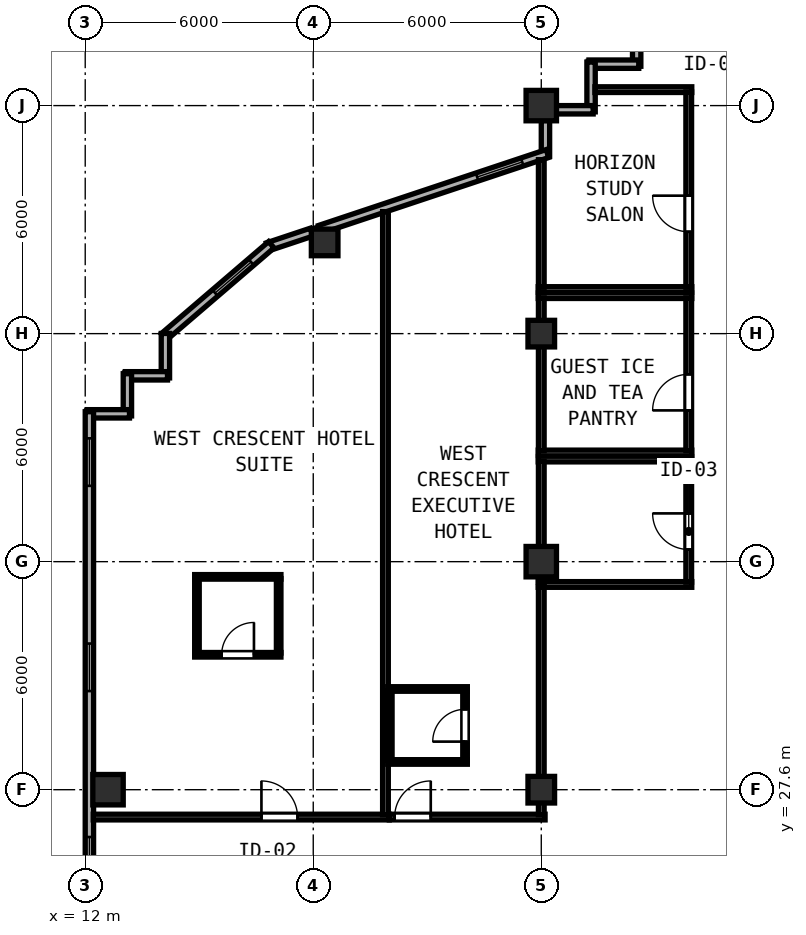
"""IFC4 building model, lengths in metres.
Left out: names, types, materials, properties, quantities, classifications, styles, units other than length and angle.
Written with IfcOpenShell. Run it as: python <this file> out.ifc"""

import sys

from ifc_helpers import new_model, si_unit, direction, frame, frame_2d, origin, origin_2d, place, context, subcontext, project, spatial, rectangle, hollow_rectangle, extrude, element, fill, save


model = new_model("IFC4")
c1 = context("Model", 3, precision=1e-05, world=origin(), true_north=direction((0.0, 1.0)))
c2 = subcontext(c1, "Body", "Model", "MODEL_VIEW")
j1 = project(units=[si_unit("LENGTHUNIT", "METRE"), si_unit("PLANEANGLEUNIT", "RADIAN")], contexts=[c1])
p1 = place(None, origin())
s1 = spatial("IfcSite", under=j1, at=p1, CompositionType="ELEMENT")
p2 = place(p1, origin())
s2 = spatial("IfcBuilding", under=s1, at=p2, CompositionType="ELEMENT")
p3 = place(p2, frame((0.0, 0.0, 246.75)))
s3 = spatial("IfcBuildingStorey", under=s2, at=p3, CompositionType="ELEMENT", Elevation=246.75)
for number, where, z_axis, x_axis in (
    (1, (24.0, 33.6, 0.0), (0.0, 0.0, 1.0), (1.0, 0.0, 0.0)),
    (2, (24.0, 45.6, 0.0), (0.0, 0.0, 1.0), (1.0, 0.0, 0.0)),
    (3, (12.6, 27.6, 0.0), (0.0, 0.0, 1.0), (1.0, 0.0, 0.0)),
):
    element("IfcColumn", number, at=place(p3, frame(where, z_axis=z_axis, x_axis=x_axis)), inside=s3, PredefinedType="COLUMN", context=c2, shape_type="SweptSolid", body=[
        extrude(hollow_rectangle(XDim=0.8, YDim=0.8, WallThickness=0.03, at=origin_2d()), origin(), (0.0, 0.0, 1.0), 3.85),
    ])
for number, where, z_axis, x_axis in (
    (4, (24.0, 27.6, 0.0), (0.0, 0.0, 1.0), (1.0, 0.0, 0.0)),
    (5, (24.0, 39.6, 0.0), (0.0, 0.0, 1.0), (1.0, 0.0, 0.0)),
    (6, (18.3, 42.0, 0.0), (0.0, 0.0, 1.0), (1.0, 0.0, 0.0)),
):
    element("IfcColumn", number, at=place(p3, frame(where, z_axis=z_axis, x_axis=x_axis)), inside=s3, PredefinedType="COLUMN", context=c2, shape_type="SweptSolid", body=[
        extrude(hollow_rectangle(XDim=0.7, YDim=0.7, WallThickness=0.026, at=origin_2d()), origin(), (0.0, 0.0, 1.0), 3.85),
    ])
p4 = place(p3, frame((26.51, 48.0, 0.0), z_axis=(0.0, 0.0, 1.0), x_axis=(0.0, -1.0, 0.0)))
e7 = element("IfcWall", 7, at=p4, inside=s3, PredefinedType="SOLIDWALL", context=c2, shape_type="SweptSolid", body=[
    extrude(rectangle(XDim=1.365, YDim=0.22, at=frame_2d((0.683, 0.0))), origin(), (0.0, 0.0, 1.0), 3.67),
])
for number, where, z_axis, x_axis in (
    (8, (26.565, 46.69, 0.0), (0.0, 0.0, 1.0), (-1.0, 0.0, 0.0)),
    (9, (25.31, 46.745, 0.0), (0.0, 0.0, 1.0), (0.0, -1.0, 0.0)),
):
    element("IfcWall", number, at=place(p3, frame(where, z_axis=z_axis, x_axis=x_axis)), inside=s3, PredefinedType="SOLIDWALL", context=c2, shape_type="SweptSolid", body=[
        extrude(rectangle(XDim=1.31, YDim=0.22, at=frame_2d((0.655, 0.0))), origin(), (0.0, 0.0, 1.0), 3.67),
    ])
p5 = place(p3, frame((25.365, 45.49, 0.0), z_axis=(0.0, 0.0, 1.0), x_axis=(-1.0, 0.0, 0.0)))
e10 = element("IfcWall", 10, at=p5, inside=s3, PredefinedType="SOLIDWALL", context=c2, shape_type="SweptSolid", body=[
    extrude(rectangle(XDim=0.973, YDim=0.22, at=frame_2d((0.486, 0.0))), origin(), (0.0, 0.0, 1.0), 3.67),
])
p6 = place(p3, frame((24.11, 45.208, 0.0), z_axis=(0.0, 0.0, 1.0), x_axis=(0.0, -1.0, 0.0)))
e11 = element("IfcWall", 11, at=p6, inside=s3, PredefinedType="SOLIDWALL", context=c2, shape_type="SweptSolid", body=[
    extrude(rectangle(XDim=0.942, YDim=0.22, at=frame_2d((0.471, 0.0))), origin(), (0.0, 0.0, 1.0), 3.315),
])
p7 = place(p3, frame((24.162, 44.338, 0.0), z_axis=(0.0, 0.0, 1.0), x_axis=(-0.948687165594, -0.31621616315, 0.0)))
e12 = element("IfcWall", 12, at=p7, inside=s3, PredefinedType="SOLIDWALL", context=c2, shape_type="SweptSolid", body=[
    extrude(rectangle(XDim=6.312, YDim=0.22, at=frame_2d((3.156, 0.0))), origin(), (0.0, 0.0, 1.0), 3.315),
])
p8 = place(p7, frame((0.7, 0.0, 0.85)))
e13 = element("IfcOpeningElement", 13, at=p8, cuts=e12, PredefinedType="OPENING", context=c2, shape_type="SweptSolid", body=[
    extrude(rectangle(XDim=1.25, YDim=1.95, at=frame_2d((0.625, 0.975))), frame((0.0, 0.12, 0.0), z_axis=(0.0, -1.0, 0.0), x_axis=(1.0, 0.0, 0.0)), (0.0, 0.0, 1.0), 0.24),
])
p9 = place(p3, frame((17.958, 42.27, 0.0), z_axis=(0.0, 0.0, 1.0), x_axis=(-0.948683298051, -0.316227766017, 0.0)))
e14 = element("IfcWall", 14, at=p9, inside=s3, PredefinedType="SOLIDWALL", context=c2, shape_type="SweptSolid", body=[
    extrude(rectangle(XDim=1.218, YDim=0.22, at=frame_2d((0.609, 0.0))), origin(), (0.0, 0.0, 1.0), 3.67),
])
p10 = place(p3, frame((16.897, 41.938, 0.0), z_axis=(0.0, 0.0, 1.0), x_axis=(-0.759279729622, -0.650764390686, 0.0)))
e15 = element("IfcWall", 15, at=p10, inside=s3, PredefinedType="SOLIDWALL", context=c2, shape_type="SweptSolid", body=[
    extrude(rectangle(XDim=3.726, YDim=0.22, at=frame_2d((1.863, 0.0))), origin(), (0.0, 0.0, 1.0), 3.67),
])
p11 = place(p10, frame((0.7, 0.0, 0.85)))
e16 = element("IfcOpeningElement", 16, at=p11, cuts=e15, PredefinedType="OPENING", context=c2, shape_type="SweptSolid", body=[
    extrude(rectangle(XDim=1.25, YDim=1.95, at=frame_2d((0.625, 0.975))), frame((0.0, 0.12, 0.0), z_axis=(0.0, -1.0, 0.0), x_axis=(1.0, 0.0, 0.0)), (0.0, 0.0, 1.0), 0.24),
])
p12 = place(p3, frame((14.11, 39.604, 0.0), z_axis=(0.0, 0.0, 1.0), x_axis=(0.0, -1.0, 0.0)))
e17 = element("IfcWall", 17, at=p12, inside=s3, PredefinedType="SOLIDWALL", context=c2, shape_type="SweptSolid", body=[
    extrude(rectangle(XDim=1.169, YDim=0.22, at=frame_2d((0.585, 0.0))), origin(), (0.0, 0.0, 1.0), 3.67),
])
p13 = place(p3, frame((14.165, 38.49, 0.0), z_axis=(0.0, 0.0, 1.0), x_axis=(-1.0, 0.0, 0.0)))
e18 = element("IfcWall", 18, at=p13, inside=s3, PredefinedType="SOLIDWALL", context=c2, shape_type="SweptSolid", body=[
    extrude(rectangle(XDim=1.11, YDim=0.22, at=frame_2d((0.555, 0.0))), origin(), (0.0, 0.0, 1.0), 3.67),
])
p14 = place(p3, frame((13.11, 38.545, 0.0), z_axis=(0.0, 0.0, 1.0), x_axis=(0.0, -1.0, 0.0)))
e19 = element("IfcWall", 19, at=p14, inside=s3, PredefinedType="SOLIDWALL", context=c2, shape_type="SweptSolid", body=[
    extrude(rectangle(XDim=1.11, YDim=0.22, at=frame_2d((0.555, 0.0))), origin(), (0.0, 0.0, 1.0), 3.67),
])
p15 = place(p3, frame((13.165, 37.49, 0.0), z_axis=(0.0, 0.0, 1.0), x_axis=(-1.0, 0.0, 0.0)))
e20 = element("IfcWall", 20, at=p15, inside=s3, PredefinedType="SOLIDWALL", context=c2, shape_type="SweptSolid", body=[
    extrude(rectangle(XDim=1.11, YDim=0.22, at=frame_2d((0.555, 0.0))), origin(), (0.0, 0.0, 1.0), 3.67),
])
p16 = place(p3, frame((12.11, 37.545, 0.0), z_axis=(0.0, 0.0, 1.0), x_axis=(0.0, -1.0, 0.0)))
e21 = element("IfcWall", 21, at=p16, inside=s3, PredefinedType="SOLIDWALL", context=c2, shape_type="SweptSolid", body=[
    extrude(rectangle(XDim=21.145, YDim=0.22, at=frame_2d((10.573, 0.0))), origin(), (0.0, 0.0, 1.0), 3.67),
])
p17 = place(p16, frame((0.7, 0.0, 0.85)))
e22 = element("IfcOpeningElement", 22, at=p17, cuts=e21, PredefinedType="OPENING", context=c2, shape_type="SweptSolid", body=[
    extrude(rectangle(XDim=1.25, YDim=1.95, at=frame_2d((0.625, 0.975))), frame((0.0, 0.12, 0.0), z_axis=(0.0, -1.0, 0.0), x_axis=(1.0, 0.0, 0.0)), (0.0, 0.0, 1.0), 0.24),
])
p18 = place(p16, frame((6.1, 0.0, 0.85)))
e23 = element("IfcOpeningElement", 23, at=p18, cuts=e21, PredefinedType="OPENING", context=c2, shape_type="SweptSolid", body=[
    extrude(rectangle(XDim=1.25, YDim=1.95, at=frame_2d((0.625, 0.975))), frame((0.0, 0.12, 0.0), z_axis=(0.0, -1.0, 0.0), x_axis=(1.0, 0.0, 0.0)), (0.0, 0.0, 1.0), 0.24),
])
p19 = place(p16, frame((11.19, 0.0, 0.85)))
e24 = element("IfcOpeningElement", 24, at=p19, cuts=e21, PredefinedType="OPENING", context=c2, shape_type="SweptSolid", body=[
    extrude(rectangle(XDim=1.25, YDim=1.95, at=frame_2d((0.625, 0.975))), frame((0.0, 0.12, 0.0), z_axis=(0.0, -1.0, 0.0), x_axis=(1.0, 0.0, 0.0)), (0.0, 0.0, 1.0), 0.24),
])
p20 = place(p16, frame((16.9, 0.0, 0.85)))
e25 = element("IfcOpeningElement", 25, at=p20, cuts=e21, PredefinedType="OPENING", context=c2, shape_type="SweptSolid", body=[
    extrude(rectangle(XDim=1.25, YDim=1.95, at=frame_2d((0.625, 0.975))), frame((0.0, 0.12, 0.0), z_axis=(0.0, -1.0, 0.0), x_axis=(1.0, 0.0, 0.0)), (0.0, 0.0, 1.0), 0.24),
])
for number, where, z_axis, x_axis in (
    (26, (23.92, 36.3, 0.0), (0.0, 0.0, 1.0), (1.0, 0.0, 0.0)),
    (27, (23.92, 33.0, 0.0), (0.0, 0.0, 1.0), (1.0, 0.0, 0.0)),
):
    element("IfcWall", number, at=place(p3, frame(where, z_axis=z_axis, x_axis=x_axis)), inside=s3, PredefinedType="PARTITIONING", context=c2, shape_type="SweptSolid", body=[
        extrude(rectangle(XDim=4.04, YDim=0.15, at=frame_2d((2.02, 0.0))), origin(), (0.0, 0.0, 1.0), 3.67),
    ])
p21 = place(p3, frame((24.0, 33.06, 0.0), z_axis=(0.0, 0.0, 1.0), x_axis=(0.0, 1.0, 0.0)))
e28 = element("IfcWall", 28, at=p21, inside=s3, PredefinedType="PARTITIONING", context=c2, shape_type="SweptSolid", body=[
    extrude(rectangle(XDim=3.18, YDim=0.15, at=frame_2d((1.59, 0.0))), origin(), (0.0, 0.0, 1.0), 3.315),
])
p22 = place(p3, frame((27.88, 33.06, 0.0), z_axis=(0.0, 0.0, 1.0), x_axis=(0.0, 1.0, 0.0)))
e29 = element("IfcWall", 29, at=p22, inside=s3, PredefinedType="PARTITIONING", context=c2, shape_type="SweptSolid", body=[
    extrude(rectangle(XDim=3.18, YDim=0.15, at=frame_2d((1.59, 0.0))), origin(), (0.0, 0.0, 1.0), 3.67),
])
p23 = place(p22, frame((1.81, 0.0, 0.0), z_axis=(0.0, 0.0, 1.0), x_axis=(-1.0, 0.0, 0.0)))
e30 = element("IfcOpeningElement", 30, at=p23, cuts=e29, PredefinedType="OPENING", context=c2, shape_type="SweptSolid", body=[
    extrude(rectangle(XDim=0.95, YDim=2.12, at=frame_2d((0.475, 1.06))), frame((0.0, 0.085, 0.0), z_axis=(0.0, -1.0, 0.0), x_axis=(1.0, 0.0, 0.0)), (0.0, 0.0, 1.0), 0.17),
])
for number, where, z_axis, x_axis in (
    (31, (23.92, 40.6, 0.0), (0.0, 0.0, 1.0), (1.0, 0.0, 0.0)),
    (32, (23.92, 36.46, 0.0), (0.0, 0.0, 1.0), (1.0, 0.0, 0.0)),
):
    element("IfcWall", number, at=place(p3, frame(where, z_axis=z_axis, x_axis=x_axis)), inside=s3, PredefinedType="PARTITIONING", context=c2, shape_type="SweptSolid", body=[
        extrude(rectangle(XDim=4.04, YDim=0.15, at=frame_2d((2.02, 0.0))), origin(), (0.0, 0.0, 1.0), 3.67),
    ])
p24 = place(p3, frame((24.0, 36.52, 0.0), z_axis=(0.0, 0.0, 1.0), x_axis=(0.0, 1.0, 0.0)))
e33 = element("IfcWall", 33, at=p24, inside=s3, PredefinedType="PARTITIONING", context=c2, shape_type="SweptSolid", body=[
    extrude(rectangle(XDim=4.02, YDim=0.15, at=frame_2d((2.01, 0.0))), origin(), (0.0, 0.0, 1.0), 3.315),
])
p25 = place(p3, frame((27.88, 36.52, 0.0), z_axis=(0.0, 0.0, 1.0), x_axis=(0.0, 1.0, 0.0)))
e34 = element("IfcWall", 34, at=p25, inside=s3, PredefinedType="PARTITIONING", context=c2, shape_type="SweptSolid", body=[
    extrude(rectangle(XDim=4.02, YDim=0.15, at=frame_2d((2.01, 0.0))), origin(), (0.0, 0.0, 1.0), 3.67),
])
p26 = place(p25, frame((2.01, 0.0, 0.0), z_axis=(0.0, 0.0, 1.0), x_axis=(-1.0, 0.0, 0.0)))
e35 = element("IfcOpeningElement", 35, at=p26, cuts=e34, PredefinedType="OPENING", context=c2, shape_type="SweptSolid", body=[
    extrude(rectangle(XDim=0.95, YDim=2.12, at=frame_2d((0.475, 1.06))), frame((0.0, 0.085, 0.0), z_axis=(0.0, -1.0, 0.0), x_axis=(1.0, 0.0, 0.0)), (0.0, 0.0, 1.0), 0.17),
])
p27 = place(p3, frame((25.412, 46.02, 0.0), z_axis=(0.0, 0.0, 1.0), x_axis=(1.0, 0.0, 0.0)))
e36 = element("IfcWall", 36, at=p27, inside=s3, PredefinedType="PARTITIONING", context=c2, shape_type="SweptSolid", body=[
    extrude(rectangle(XDim=2.548, YDim=0.15, at=frame_2d((1.274, 0.0))), origin(), (0.0, 0.0, 1.0), 3.67),
])
p28 = place(p3, frame((23.92, 40.76, 0.0), z_axis=(0.0, 0.0, 1.0), x_axis=(1.0, 0.0, 0.0)))
e37 = element("IfcWall", 37, at=p28, inside=s3, PredefinedType="PARTITIONING", context=c2, shape_type="SweptSolid", body=[
    extrude(rectangle(XDim=4.04, YDim=0.15, at=frame_2d((2.02, 0.0))), origin(), (0.0, 0.0, 1.0), 3.67),
])
p29 = place(p3, frame((24.0, 40.82, 0.0), z_axis=(0.0, 0.0, 1.0), x_axis=(0.0, 1.0, 0.0)))
e38 = element("IfcWall", 38, at=p29, inside=s3, PredefinedType="PARTITIONING", context=c2, shape_type="SweptSolid", body=[
    extrude(rectangle(XDim=3.356, YDim=0.15, at=frame_2d((1.678, 0.0))), origin(), (0.0, 0.0, 1.0), 3.315),
])
p30 = place(p3, frame((27.88, 40.82, 0.0), z_axis=(0.0, 0.0, 1.0), x_axis=(0.0, 1.0, 0.0)))
e39 = element("IfcWall", 39, at=p30, inside=s3, PredefinedType="PARTITIONING", context=c2, shape_type="SweptSolid", body=[
    extrude(rectangle(XDim=5.14, YDim=0.15, at=frame_2d((2.57, 0.0))), origin(), (0.0, 0.0, 1.0), 3.67),
])
p31 = place(p30, frame((2.41, 0.0, 0.0), z_axis=(0.0, 0.0, 1.0), x_axis=(-1.0, 0.0, 0.0)))
e40 = element("IfcOpeningElement", 40, at=p31, cuts=e39, PredefinedType="OPENING", context=c2, shape_type="SweptSolid", body=[
    extrude(rectangle(XDim=0.95, YDim=2.12, at=frame_2d((0.475, 1.06))), frame((0.0, 0.085, 0.0), z_axis=(0.0, -1.0, 0.0), x_axis=(1.0, 0.0, 0.0)), (0.0, 0.0, 1.0), 0.17),
])
p32 = place(p3, frame((12.212, 26.88, 0.0), z_axis=(0.0, 0.0, 1.0), x_axis=(1.0, 0.0, 0.0)))
e41 = element("IfcWall", 41, at=p32, inside=s3, PredefinedType="PARTITIONING", context=c2, shape_type="SweptSolid", body=[
    extrude(rectangle(XDim=7.788, YDim=0.15, at=frame_2d((3.894, 0.0))), origin(), (0.0, 0.0, 1.0), 3.67),
])
p33 = place(p32, frame((4.425, 0.0, 0.0)))
e42 = element("IfcOpeningElement", 42, at=p33, cuts=e41, PredefinedType="OPENING", context=c2, shape_type="SweptSolid", body=[
    extrude(rectangle(XDim=0.95, YDim=2.18, at=frame_2d((0.475, 1.09))), frame((0.0, 0.085, 0.0), z_axis=(0.0, -1.0, 0.0), x_axis=(1.0, 0.0, 0.0)), (0.0, 0.0, 1.0), 0.17),
])
p34 = place(p3, frame((19.9, 26.94, 0.0), z_axis=(0.0, 0.0, 1.0), x_axis=(0.0, 1.0, 0.0)))
e43 = element("IfcWall", 43, at=p34, inside=s3, PredefinedType="PARTITIONING", context=c2, shape_type="SweptSolid", body=[
    extrude(rectangle(XDim=15.87, YDim=0.15, at=frame_2d((7.935, 0.0))), origin(), (0.0, 0.0, 1.0), 3.67),
])
p35 = place(p3, frame((14.88, 33.2, 0.0), z_axis=(0.0, 0.0, 1.0), x_axis=(1.0, 0.0, 0.0)))
e44 = element("IfcWall", 44, at=p35, inside=s3, PredefinedType="PARTITIONING", context=c2, shape_type="SweptSolid", body=[
    extrude(rectangle(XDim=2.27, YDim=0.12, at=frame_2d((1.135, 0.0))), origin(), (0.0, 0.0, 1.0), 3.67),
])
p36 = place(p3, frame((14.88, 31.15, 0.0), z_axis=(0.0, 0.0, 1.0), x_axis=(1.0, 0.0, 0.0)))
e45 = element("IfcWall", 45, at=p36, inside=s3, PredefinedType="PARTITIONING", context=c2, shape_type="SweptSolid", body=[
    extrude(rectangle(XDim=2.27, YDim=0.12, at=frame_2d((1.135, 0.0))), origin(), (0.0, 0.0, 1.0), 3.67),
])
p37 = place(p36, frame((0.71, 0.0, 0.0)))
e46 = element("IfcOpeningElement", 46, at=p37, cuts=e45, PredefinedType="OPENING", context=c2, shape_type="SweptSolid", body=[
    extrude(rectangle(XDim=0.85, YDim=2.1, at=frame_2d((0.425, 1.05))), frame((0.0, 0.07, 0.0), z_axis=(0.0, -1.0, 0.0), x_axis=(1.0, 0.0, 0.0)), (0.0, 0.0, 1.0), 0.14),
])
for number, where, z_axis, x_axis in (
    (47, (14.94, 31.195, 0.0), (0.0, 0.0, 1.0), (0.0, 1.0, 0.0)),
    (48, (17.09, 31.195, 0.0), (0.0, 0.0, 1.0), (0.0, 1.0, 0.0)),
):
    element("IfcWall", number, at=place(p3, frame(where, z_axis=z_axis, x_axis=x_axis)), inside=s3, PredefinedType="PARTITIONING", context=c2, shape_type="SweptSolid", body=[
        extrude(rectangle(XDim=1.96, YDim=0.12, at=frame_2d((0.98, 0.0))), origin(), (0.0, 0.0, 1.0), 3.67),
    ])
p38 = place(p3, frame((20.002, 26.88, 0.0), z_axis=(0.0, 0.0, 1.0), x_axis=(1.0, 0.0, 0.0)))
e49 = element("IfcWall", 49, at=p38, inside=s3, PredefinedType="PARTITIONING", context=c2, shape_type="SweptSolid", body=[
    extrude(rectangle(XDim=4.098, YDim=0.15, at=frame_2d((2.049, 0.0))), origin(), (0.0, 0.0, 1.0), 3.67),
])
p39 = place(p38, frame((0.14, 0.0, 0.0)))
e50 = element("IfcOpeningElement", 50, at=p39, cuts=e49, PredefinedType="OPENING", context=c2, shape_type="SweptSolid", body=[
    extrude(rectangle(XDim=0.95, YDim=2.18, at=frame_2d((0.475, 1.09))), frame((0.0, 0.085, 0.0), z_axis=(0.0, -1.0, 0.0), x_axis=(1.0, 0.0, 0.0)), (0.0, 0.0, 1.0), 0.17),
])
p40 = place(p3, frame((24.0, 26.94, 0.0), z_axis=(0.0, 0.0, 1.0), x_axis=(0.0, 1.0, 0.0)))
e51 = element("IfcWall", 51, at=p40, inside=s3, PredefinedType="PARTITIONING", context=c2, shape_type="SweptSolid", body=[
    extrude(rectangle(XDim=6.0, YDim=0.15, at=frame_2d((3.0, 0.0))), origin(), (0.0, 0.0, 1.0), 3.315),
])
for number, where, z_axis, x_axis in (
    (52, (19.96, 30.25, 0.0), (0.0, 0.0, 1.0), (1.0, 0.0, 0.0)),
    (53, (19.96, 28.33, 0.0), (0.0, 0.0, 1.0), (1.0, 0.0, 0.0)),
):
    element("IfcWall", number, at=place(p3, frame(where, z_axis=z_axis, x_axis=x_axis)), inside=s3, PredefinedType="PARTITIONING", context=c2, shape_type="SweptSolid", body=[
        extrude(rectangle(XDim=2.094, YDim=0.12, at=frame_2d((1.047, 0.0))), origin(), (0.0, 0.0, 1.0), 3.67),
    ])
p41 = place(p3, frame((20.014, 28.375, 0.0), z_axis=(0.0, 0.0, 1.0), x_axis=(0.0, 1.0, 0.0)))
e54 = element("IfcWall", 54, at=p41, inside=s3, PredefinedType="PARTITIONING", context=c2, shape_type="SweptSolid", body=[
    extrude(rectangle(XDim=1.83, YDim=0.12, at=frame_2d((0.915, 0.0))), origin(), (0.0, 0.0, 1.0), 3.67),
])
p42 = place(p3, frame((21.994, 28.375, 0.0), z_axis=(0.0, 0.0, 1.0), x_axis=(0.0, 1.0, 0.0)))
e55 = element("IfcWall", 55, at=p42, inside=s3, PredefinedType="PARTITIONING", context=c2, shape_type="SweptSolid", body=[
    extrude(rectangle(XDim=1.83, YDim=0.12, at=frame_2d((0.915, 0.0))), origin(), (0.0, 0.0, 1.0), 3.67),
])
p43 = place(p42, frame((0.49, 0.0, 0.0)))
e56 = element("IfcOpeningElement", 56, at=p43, cuts=e55, PredefinedType="OPENING", context=c2, shape_type="SweptSolid", body=[
    extrude(rectangle(XDim=0.85, YDim=2.1, at=frame_2d((0.425, 1.05))), frame((0.0, 0.07, 0.0), z_axis=(0.0, -1.0, 0.0), x_axis=(1.0, 0.0, 0.0)), (0.0, 0.0, 1.0), 0.14),
])
p44 = place(p8, origin())
e57 = element("IfcWindow", 57, at=p44, inside=s3, PartitioningType="SINGLE_PANEL", PredefinedType="WINDOW", context=c2, shape_type="SweptSolid", body=[
    extrude(rectangle(XDim=1.25, YDim=1.95, at=frame_2d((0.625, 0.975))), frame((0.0, 0.03, 0.0), z_axis=(0.0, -1.0, 0.0), x_axis=(1.0, 0.0, 0.0)), (0.0, 0.0, 1.0), 0.06),
])
fill(e13, e57)
p45 = place(p11, origin())
e58 = element("IfcWindow", 58, at=p45, inside=s3, PartitioningType="SINGLE_PANEL", PredefinedType="WINDOW", context=c2, shape_type="SweptSolid", body=[
    extrude(rectangle(XDim=1.25, YDim=1.95, at=frame_2d((0.625, 0.975))), frame((0.0, 0.03, 0.0), z_axis=(0.0, -1.0, 0.0), x_axis=(1.0, 0.0, 0.0)), (0.0, 0.0, 1.0), 0.06),
])
fill(e16, e58)
p46 = place(p17, origin())
e59 = element("IfcWindow", 59, at=p46, inside=s3, PartitioningType="SINGLE_PANEL", PredefinedType="WINDOW", context=c2, shape_type="SweptSolid", body=[
    extrude(rectangle(XDim=1.25, YDim=1.95, at=frame_2d((0.625, 0.975))), frame((0.0, 0.03, 0.0), z_axis=(0.0, -1.0, 0.0), x_axis=(1.0, 0.0, 0.0)), (0.0, 0.0, 1.0), 0.06),
])
fill(e22, e59)
p47 = place(p18, origin())
e60 = element("IfcWindow", 60, at=p47, inside=s3, PartitioningType="SINGLE_PANEL", PredefinedType="WINDOW", context=c2, shape_type="SweptSolid", body=[
    extrude(rectangle(XDim=1.25, YDim=1.95, at=frame_2d((0.625, 0.975))), frame((0.0, 0.03, 0.0), z_axis=(0.0, -1.0, 0.0), x_axis=(1.0, 0.0, 0.0)), (0.0, 0.0, 1.0), 0.06),
])
fill(e23, e60)
p48 = place(p19, origin())
e61 = element("IfcWindow", 61, at=p48, inside=s3, PartitioningType="SINGLE_PANEL", PredefinedType="WINDOW", context=c2, shape_type="SweptSolid", body=[
    extrude(rectangle(XDim=1.25, YDim=1.95, at=frame_2d((0.625, 0.975))), frame((0.0, 0.03, 0.0), z_axis=(0.0, -1.0, 0.0), x_axis=(1.0, 0.0, 0.0)), (0.0, 0.0, 1.0), 0.06),
])
fill(e24, e61)
p49 = place(p23, origin())
e62 = element("IfcDoor", 62, at=p49, inside=s3, OperationType="SINGLE_SWING_LEFT", PredefinedType="DOOR", context=c2, shape_type="SweptSolid", body=[
    extrude(rectangle(XDim=0.95, YDim=2.12, at=frame_2d((0.475, 1.06))), frame((0.0, 0.025, 0.0), z_axis=(0.0, -1.0, 0.0), x_axis=(1.0, 0.0, 0.0)), (0.0, 0.0, 1.0), 0.05),
])
fill(e30, e62)
p50 = place(p26, origin())
e63 = element("IfcDoor", 63, at=p50, inside=s3, OperationType="SINGLE_SWING_RIGHT", PredefinedType="DOOR", context=c2, shape_type="SweptSolid", body=[
    extrude(rectangle(XDim=0.95, YDim=2.12, at=frame_2d((0.475, 1.06))), frame((0.0, 0.025, 0.0), z_axis=(0.0, -1.0, 0.0), x_axis=(1.0, 0.0, 0.0)), (0.0, 0.0, 1.0), 0.05),
])
fill(e35, e63)
p51 = place(p31, origin())
e64 = element("IfcDoor", 64, at=p51, inside=s3, OperationType="SINGLE_SWING_LEFT", PredefinedType="DOOR", context=c2, shape_type="SweptSolid", body=[
    extrude(rectangle(XDim=0.95, YDim=2.12, at=frame_2d((0.475, 1.06))), frame((0.0, 0.025, 0.0), z_axis=(0.0, -1.0, 0.0), x_axis=(1.0, 0.0, 0.0)), (0.0, 0.0, 1.0), 0.05),
])
fill(e40, e64)
p52 = place(p33, origin())
e65 = element("IfcDoor", 65, at=p52, inside=s3, OperationType="SINGLE_SWING_LEFT", PredefinedType="DOOR", context=c2, shape_type="SweptSolid", body=[
    extrude(rectangle(XDim=0.95, YDim=2.18, at=frame_2d((0.475, 1.09))), frame((0.0, 0.025, 0.0), z_axis=(0.0, -1.0, 0.0), x_axis=(1.0, 0.0, 0.0)), (0.0, 0.0, 1.0), 0.05),
])
fill(e42, e65)
p53 = place(p37, origin())
e66 = element("IfcDoor", 66, at=p53, inside=s3, OperationType="SINGLE_SWING_RIGHT", PredefinedType="DOOR", context=c2, shape_type="SweptSolid", body=[
    extrude(rectangle(XDim=0.85, YDim=2.1, at=frame_2d((0.425, 1.05))), frame((0.0, 0.025, 0.0), z_axis=(0.0, -1.0, 0.0), x_axis=(1.0, 0.0, 0.0)), (0.0, 0.0, 1.0), 0.05),
])
fill(e46, e66)
p54 = place(p39, origin())
e67 = element("IfcDoor", 67, at=p54, inside=s3, OperationType="SINGLE_SWING_RIGHT", PredefinedType="DOOR", context=c2, shape_type="SweptSolid", body=[
    extrude(rectangle(XDim=0.95, YDim=2.18, at=frame_2d((0.475, 1.09))), frame((0.0, 0.025, 0.0), z_axis=(0.0, -1.0, 0.0), x_axis=(1.0, 0.0, 0.0)), (0.0, 0.0, 1.0), 0.05),
])
fill(e50, e67)
p55 = place(p43, origin())
e68 = element("IfcDoor", 68, at=p55, inside=s3, OperationType="SINGLE_SWING_LEFT", PredefinedType="DOOR", context=c2, shape_type="SweptSolid", body=[
    extrude(rectangle(XDim=0.85, YDim=2.1, at=frame_2d((0.425, 1.05))), frame((0.0, 0.025, 0.0), z_axis=(0.0, -1.0, 0.0), x_axis=(1.0, 0.0, 0.0)), (0.0, 0.0, 1.0), 0.05),
])
fill(e56, e68)
save(model, sys.argv[1])
